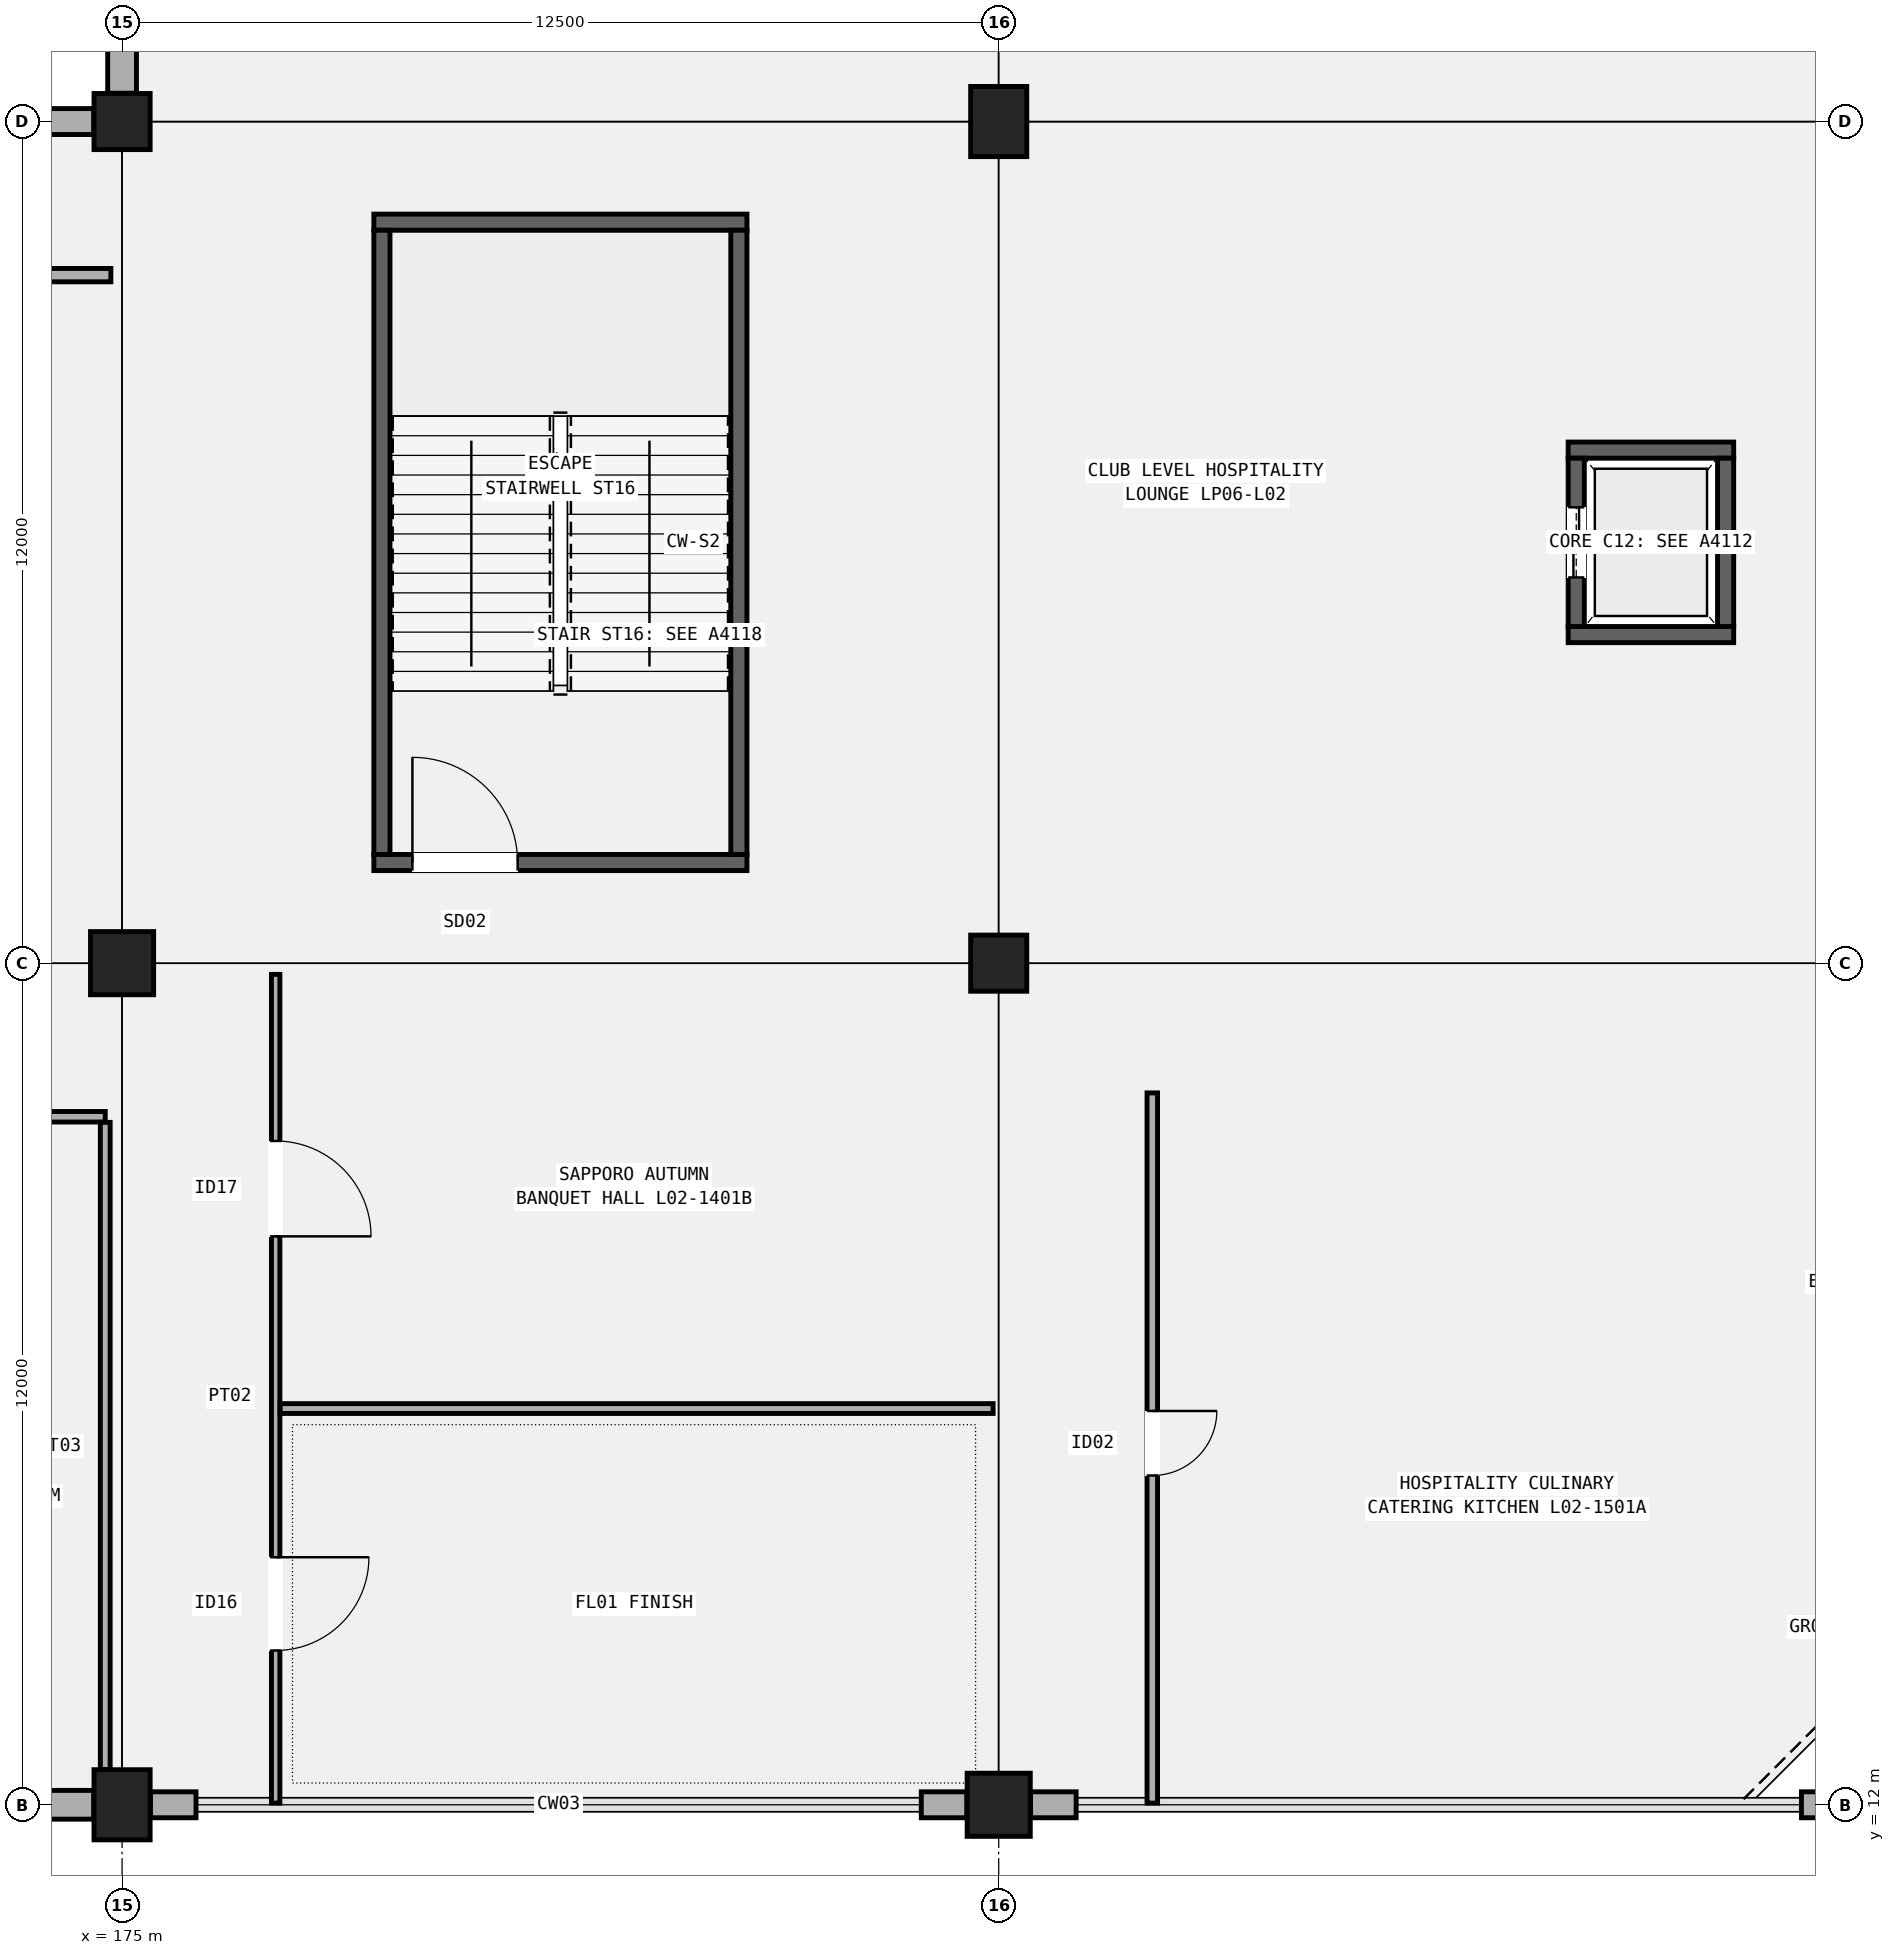
"""IFC4 building model, lengths in metres.
Left out: names, types, materials, properties, quantities, classifications, styles, units other than length and angle.
Written with IfcOpenShell. Run it as: python <this file> out.ifc"""

import sys

from ifc_helpers import new_model, si_unit, direction, frame, frame_2d, origin, origin_2d, place, context, subcontext, project, spatial, rectangle, extrude, element, fill, save


model = new_model("IFC4")
c1 = context("Model", 3, precision=1e-05, world=origin(), true_north=direction((0.0, 1.0)))
c2 = subcontext(c1, "Body", "Model", "MODEL_VIEW")
j1 = project(units=[si_unit("LENGTHUNIT", "METRE"), si_unit("PLANEANGLEUNIT", "RADIAN")], contexts=[c1])
p1 = place(None, origin())
s1 = spatial("IfcSite", under=j1, at=p1, CompositionType="ELEMENT")
p2 = place(p1, origin())
s2 = spatial("IfcBuilding", under=s1, at=p2, CompositionType="ELEMENT")
p3 = place(p2, frame((0.0, 0.0, 10.2)))
s3 = spatial("IfcBuildingStorey", under=s2, at=p3, CompositionType="ELEMENT", Elevation=10.2)
p4 = place(p3, frame((175.0, 12.0, 0.0), z_axis=(0.0, 0.0, 1.0), x_axis=(1.0, 0.0, 0.0)))
e1 = element("IfcColumn", 1, at=p4, inside=s3, PredefinedType="COLUMN", context=c2, shape_type="SweptSolid", body=[
    extrude(rectangle(XDim=0.8, YDim=1.0, at=origin_2d()), origin(), (0.0, 0.0, 1.0), 5.1),
])
p5 = place(p3, frame((175.0, 24.0, 0.0), z_axis=(0.0, 0.0, 1.0), x_axis=(1.0, 0.0, 0.0)))
e2 = element("IfcColumn", 2, at=p5, inside=s3, PredefinedType="COLUMN", context=c2, shape_type="SweptSolid", body=[
    extrude(rectangle(XDim=0.9, YDim=0.9, at=origin_2d()), origin(), (0.0, 0.0, 1.0), 5.1),
])
p6 = place(p3, frame((175.0, 36.0, 0.0), z_axis=(0.0, 0.0, 1.0), x_axis=(1.0, 0.0, 0.0)))
e3 = element("IfcColumn", 3, at=p6, inside=s3, PredefinedType="COLUMN", context=c2, shape_type="SweptSolid", body=[
    extrude(rectangle(XDim=0.8, YDim=0.8, at=origin_2d()), origin(), (0.0, 0.0, 1.0), 5.1),
])
p7 = place(p3, frame((187.5, 12.0, 0.0), z_axis=(0.0, 0.0, 1.0), x_axis=(1.0, 0.0, 0.0)))
e4 = element("IfcColumn", 4, at=p7, inside=s3, PredefinedType="COLUMN", context=c2, shape_type="SweptSolid", body=[
    extrude(rectangle(XDim=0.9, YDim=0.9, at=origin_2d()), origin(), (0.0, 0.0, 1.0), 5.1),
])
p8 = place(p3, frame((187.5, 24.0, 0.0), z_axis=(0.0, 0.0, 1.0), x_axis=(1.0, 0.0, 0.0)))
e5 = element("IfcColumn", 5, at=p8, inside=s3, PredefinedType="COLUMN", context=c2, shape_type="SweptSolid", body=[
    extrude(rectangle(XDim=0.8, YDim=0.8, at=origin_2d()), origin(), (0.0, 0.0, 1.0), 5.1),
])
p9 = place(p3, frame((187.5, 36.0, 0.0), z_axis=(0.0, 0.0, 1.0), x_axis=(1.0, 0.0, 0.0)))
e6 = element("IfcColumn", 6, at=p9, inside=s3, PredefinedType="COLUMN", context=c2, shape_type="SweptSolid", body=[
    extrude(rectangle(XDim=0.8, YDim=1.0, at=origin_2d()), origin(), (0.0, 0.0, 1.0), 5.1),
])
p10 = place(p3, frame((162.904, 12.0, 0.0), z_axis=(0.0, 0.0, 1.0), x_axis=(1.0, 0.0, 0.0)))
e7 = element("IfcWall", 7, at=p10, inside=s3, PredefinedType="SOLIDWALL", context=c2, shape_type="SweptSolid", body=[
    extrude(rectangle(XDim=11.692, YDim=0.41, at=frame_2d((5.846, 0.0))), origin(), (0.0, 0.0, 1.0), 4.22),
])
p11 = place(p10, frame((3.404, 0.0, 0.95)))
e8 = element("IfcOpeningElement", 8, at=p11, cuts=e7, PredefinedType="OPENING", context=c2, shape_type="SweptSolid", body=[
    extrude(rectangle(XDim=3.3, YDim=1.8, at=frame_2d((1.65, 0.9))), frame((0.0, 0.215, 0.0), z_axis=(0.0, -1.0, 0.0), x_axis=(1.0, 0.0, 0.0)), (0.0, 0.0, 1.0), 0.43),
])
p12 = place(p3, frame((173.946, 36.0, 0.0), z_axis=(0.0, 0.0, 1.0), x_axis=(1.0, 0.0, 0.0)))
e9 = element("IfcWall", 9, at=p12, inside=s3, PredefinedType="SOLIDWALL", context=c2, shape_type="SweptSolid", body=[
    extrude(rectangle(XDim=0.65, YDim=0.37, at=frame_2d((0.325, 0.0))), origin(), (0.0, 0.0, 1.0), 4.12),
])
for number, where, z_axis, x_axis in (
    (10, (175.404, 12.0, 0.0), (0.0, 0.0, 1.0), (1.0, 0.0, 0.0)),
    (11, (186.396, 12.0, 0.0), (0.0, 0.0, 1.0), (1.0, 0.0, 0.0)),
):
    element("IfcWall", number, at=place(p3, frame(where, z_axis=z_axis, x_axis=x_axis)), inside=s3, PredefinedType="SOLIDWALL", context=c2, shape_type="SweptSolid", body=[
        extrude(rectangle(XDim=0.65, YDim=0.37, at=frame_2d((0.325, 0.0))), origin(), (0.0, 0.0, 1.0), 4.02),
    ])
p13 = place(p3, frame((175.0, 36.404, 0.0), z_axis=(0.0, 0.0, 1.0), x_axis=(0.0, 1.0, 0.0)))
e12 = element("IfcWall", 12, at=p13, inside=s3, PredefinedType="SOLIDWALL", context=c2, shape_type="SweptSolid", body=[
    extrude(rectangle(XDim=11.092, YDim=0.41, at=frame_2d((5.546, 0.0))), origin(), (0.0, 0.0, 1.0), 4.232),
])
p14 = place(p13, frame((1.5, 0.0, 0.95)))
e13 = element("IfcOpeningElement", 13, at=p14, cuts=e12, PredefinedType="OPENING", context=c2, shape_type="SweptSolid", body=[
    extrude(rectangle(XDim=3.6, YDim=2.15, at=frame_2d((1.8, 1.075))), frame((0.0, 0.215, 0.0), z_axis=(0.0, -1.0, 0.0), x_axis=(1.0, 0.0, 0.0)), (0.0, 0.0, 1.0), 0.43),
])
for number, where, z_axis, x_axis in (
    (14, (187.954, 12.0, 0.0), (0.0, 0.0, 1.0), (1.0, 0.0, 0.0)),
    (15, (198.946, 12.0, 0.0), (0.0, 0.0, 1.0), (1.0, 0.0, 0.0)),
):
    element("IfcWall", number, at=place(p3, frame(where, z_axis=z_axis, x_axis=x_axis)), inside=s3, PredefinedType="SOLIDWALL", context=c2, shape_type="SweptSolid", body=[
        extrude(rectangle(XDim=0.65, YDim=0.37, at=frame_2d((0.325, 0.0))), origin(), (0.0, 0.0, 1.0), 4.12),
    ])
p15 = place(p3, frame((178.59, 25.435, 0.0), z_axis=(0.0, 0.0, 1.0), x_axis=(1.0, 0.0, 0.0)))
e16 = element("IfcWall", 16, at=p15, inside=s3, PredefinedType="SHEAR", context=c2, shape_type="SweptSolid", body=[
    extrude(rectangle(XDim=5.32, YDim=0.23, at=frame_2d((2.66, 0.0))), origin(), (0.0, 0.0, 1.0), 4.82),
])
p16 = place(p15, frame((0.55, 0.0, 0.0)))
e17 = element("IfcOpeningElement", 17, at=p16, cuts=e16, PredefinedType="OPENING", context=c2, shape_type="SweptSolid", body=[
    extrude(rectangle(XDim=1.5, YDim=2.2, at=frame_2d((0.75, 1.1))), frame((0.0, 0.125, 0.0), z_axis=(0.0, -1.0, 0.0), x_axis=(1.0, 0.0, 0.0)), (0.0, 0.0, 1.0), 0.25),
])
p17 = place(p3, frame((178.59, 34.565, 0.0), z_axis=(0.0, 0.0, 1.0), x_axis=(1.0, 0.0, 0.0)))
e18 = element("IfcWall", 18, at=p17, inside=s3, PredefinedType="SHEAR", context=c2, shape_type="SweptSolid", body=[
    extrude(rectangle(XDim=5.32, YDim=0.23, at=frame_2d((2.66, 0.0))), origin(), (0.0, 0.0, 1.0), 4.82),
])
for number, where, z_axis, x_axis in (
    (19, (178.705, 25.55, 0.0), (0.0, 0.0, 1.0), (0.0, 1.0, 0.0)),
    (20, (183.795, 25.55, 0.0), (0.0, 0.0, 1.0), (0.0, 1.0, 0.0)),
):
    element("IfcWall", number, at=place(p3, frame(where, z_axis=z_axis, x_axis=x_axis)), inside=s3, PredefinedType="SHEAR", context=c2, shape_type="SweptSolid", body=[
        extrude(rectangle(XDim=8.9, YDim=0.23, at=frame_2d((4.45, 0.0))), origin(), (0.0, 0.0, 1.0), 4.82),
    ])
for number, where, z_axis, x_axis in (
    (21, (195.62, 28.685, 0.0), (0.0, 0.0, 1.0), (1.0, 0.0, 0.0)),
    (22, (195.62, 31.315, 0.0), (0.0, 0.0, 1.0), (1.0, 0.0, 0.0)),
):
    element("IfcWall", number, at=place(p3, frame(where, z_axis=z_axis, x_axis=x_axis)), inside=s3, PredefinedType="SHEAR", context=c2, shape_type="SweptSolid", body=[
        extrude(rectangle(XDim=2.36, YDim=0.23, at=frame_2d((1.18, 0.0))), origin(), (0.0, 0.0, 1.0), 4.82),
    ])
p18 = place(p3, frame((195.735, 28.8, 0.0), z_axis=(0.0, 0.0, 1.0), x_axis=(0.0, 1.0, 0.0)))
e23 = element("IfcWall", 23, at=p18, inside=s3, PredefinedType="SHEAR", context=c2, shape_type="SweptSolid", body=[
    extrude(rectangle(XDim=2.4, YDim=0.23, at=frame_2d((1.2, 0.0))), origin(), (0.0, 0.0, 1.0), 4.82),
])
p19 = place(p18, frame((0.7, 0.0, 0.0)))
e24 = element("IfcOpeningElement", 24, at=p19, cuts=e23, PredefinedType="OPENING", context=c2, shape_type="SweptSolid", body=[
    extrude(rectangle(XDim=1.0, YDim=2.15, at=frame_2d((0.5, 1.075))), frame((0.0, 0.125, 0.0), z_axis=(0.0, -1.0, 0.0), x_axis=(1.0, 0.0, 0.0)), (0.0, 0.0, 1.0), 0.25),
])
p20 = place(p3, frame((197.865, 28.8, 0.0), z_axis=(0.0, 0.0, 1.0), x_axis=(0.0, 1.0, 0.0)))
e25 = element("IfcWall", 25, at=p20, inside=s3, PredefinedType="SHEAR", context=c2, shape_type="SweptSolid", body=[
    extrude(rectangle(XDim=2.4, YDim=0.23, at=frame_2d((1.2, 0.0))), origin(), (0.0, 0.0, 1.0), 4.82),
])
p21 = place(p3, frame((162.74, 21.81, 0.0), z_axis=(0.0, 0.0, 1.0), x_axis=(1.0, 0.0, 0.0)))
e26 = element("IfcWall", 26, at=p21, inside=s3, PredefinedType="PARTITIONING", context=c2, shape_type="SweptSolid", body=[
    extrude(rectangle(XDim=12.02, YDim=0.15, at=frame_2d((6.01, 0.0))), origin(), (0.0, 0.0, 1.0), 4.22),
])
p22 = place(p21, frame((2.062, 0.0, 0.0), z_axis=(0.0, 0.0, 1.0), x_axis=(-1.0, 0.0, 0.0)))
e27 = element("IfcOpeningElement", 27, at=p22, cuts=e26, PredefinedType="OPENING", context=c2, shape_type="SweptSolid", body=[
    extrude(rectangle(XDim=1.12, YDim=2.18, at=frame_2d((0.56, 1.09))), frame((0.0, 0.085, 0.0), z_axis=(0.0, -1.0, 0.0), x_axis=(1.0, 0.0, 0.0)), (0.0, 0.0, 1.0), 0.17),
])
p23 = place(p21, frame((5.833, 0.0, 0.0), z_axis=(0.0, 0.0, 1.0), x_axis=(-1.0, 0.0, 0.0)))
e28 = element("IfcOpeningElement", 28, at=p23, cuts=e26, PredefinedType="OPENING", context=c2, shape_type="SweptSolid", body=[
    extrude(rectangle(XDim=1.15, YDim=2.15, at=frame_2d((0.575, 1.075))), frame((0.0, 0.085, 0.0), z_axis=(0.0, -1.0, 0.0), x_axis=(1.0, 0.0, 0.0)), (0.0, 0.0, 1.0), 0.17),
])
p24 = place(p21, frame((10.356, 0.0, 0.0), z_axis=(0.0, 0.0, 1.0), x_axis=(-1.0, 0.0, 0.0)))
e29 = element("IfcOpeningElement", 29, at=p24, cuts=e26, PredefinedType="OPENING", context=c2, shape_type="SweptSolid", body=[
    extrude(rectangle(XDim=1.18, YDim=2.2, at=frame_2d((0.59, 1.1))), frame((0.0, 0.085, 0.0), z_axis=(0.0, -1.0, 0.0), x_axis=(1.0, 0.0, 0.0)), (0.0, 0.0, 1.0), 0.17),
])
p25 = place(p3, frame((174.76, 12.504, 0.0), z_axis=(0.0, 0.0, 1.0), x_axis=(0.0, 1.0, 0.0)))
e30 = element("IfcWall", 30, at=p25, inside=s3, PredefinedType="PARTITIONING", context=c2, shape_type="SweptSolid", body=[
    extrude(rectangle(XDim=9.226, YDim=0.14, at=frame_2d((4.613, 0.0))), origin(), (0.0, 0.0, 1.0), 3.98),
])
p26 = place(p3, frame((162.66, 33.81, 0.0), z_axis=(0.0, 0.0, 1.0), x_axis=(1.0, 0.0, 0.0)))
e31 = element("IfcWall", 31, at=p26, inside=s3, PredefinedType="PARTITIONING", context=c2, shape_type="SweptSolid", body=[
    extrude(rectangle(XDim=12.18, YDim=0.19, at=frame_2d((6.09, 0.0))), origin(), (0.0, 0.0, 1.0), 4.22),
])
p27 = place(p26, frame((6.695, 0.0, 0.0), z_axis=(0.0, 0.0, 1.0), x_axis=(-1.0, 0.0, 0.0)))
e32 = element("IfcOpeningElement", 32, at=p27, cuts=e31, PredefinedType="OPENING", context=c2, shape_type="SweptSolid", body=[
    extrude(rectangle(XDim=1.21, YDim=2.18, at=frame_2d((0.605, 1.09))), frame((0.0, 0.105, 0.0), z_axis=(0.0, -1.0, 0.0), x_axis=(1.0, 0.0, 0.0)), (0.0, 0.0, 1.0), 0.21),
])
p28 = place(p3, frame((177.19, 12.024, 0.0), z_axis=(0.0, 0.0, 1.0), x_axis=(0.0, 1.0, 0.0)))
e33 = element("IfcWall", 33, at=p28, inside=s3, PredefinedType="PARTITIONING", context=c2, shape_type="SweptSolid", body=[
    extrude(rectangle(XDim=11.816, YDim=0.12, at=frame_2d((5.908, 0.0))), origin(), (0.0, 0.0, 1.0), 4.22),
])
p29 = place(p28, frame((3.506, 0.0, 0.0), z_axis=(0.0, 0.0, 1.0), x_axis=(-1.0, 0.0, 0.0)))
e34 = element("IfcOpeningElement", 34, at=p29, cuts=e33, PredefinedType="OPENING", context=c2, shape_type="SweptSolid", body=[
    extrude(rectangle(XDim=1.33, YDim=2.22, at=frame_2d((0.665, 1.11))), frame((0.0, 0.07, 0.0), z_axis=(0.0, -1.0, 0.0), x_axis=(1.0, 0.0, 0.0)), (0.0, 0.0, 1.0), 0.14),
])
p30 = place(p28, frame((9.441, 0.0, 0.0), z_axis=(0.0, 0.0, 1.0), x_axis=(-1.0, 0.0, 0.0)))
e35 = element("IfcOpeningElement", 35, at=p30, cuts=e33, PredefinedType="OPENING", context=c2, shape_type="SweptSolid", body=[
    extrude(rectangle(XDim=1.36, YDim=2.25, at=frame_2d((0.68, 1.125))), frame((0.0, 0.07, 0.0), z_axis=(0.0, -1.0, 0.0), x_axis=(1.0, 0.0, 0.0)), (0.0, 0.0, 1.0), 0.14),
])
p31 = place(p3, frame((177.255, 17.65, 0.0), z_axis=(0.0, 0.0, 1.0), x_axis=(1.0, 0.0, 0.0)))
e36 = element("IfcWall", 36, at=p31, inside=s3, PredefinedType="PARTITIONING", context=c2, shape_type="SweptSolid", body=[
    extrude(rectangle(XDim=10.165, YDim=0.14, at=frame_2d((5.083, 0.0))), origin(), (0.0, 0.0, 1.0), 4.22),
])
p32 = place(p3, frame((189.69, 12.024, 0.0), z_axis=(0.0, 0.0, 1.0), x_axis=(0.0, 1.0, 0.0)))
e37 = element("IfcWall", 37, at=p32, inside=s3, PredefinedType="PARTITIONING", context=c2, shape_type="SweptSolid", body=[
    extrude(rectangle(XDim=10.126, YDim=0.15, at=frame_2d((5.063, 0.0))), origin(), (0.0, 0.0, 1.0), 4.22),
])
p33 = place(p32, frame((5.591, 0.0, 0.0), z_axis=(0.0, 0.0, 1.0), x_axis=(-1.0, 0.0, 0.0)))
e38 = element("IfcOpeningElement", 38, at=p33, cuts=e37, PredefinedType="OPENING", context=c2, shape_type="SweptSolid", body=[
    extrude(rectangle(XDim=0.92, YDim=2.1, at=frame_2d((0.46, 1.05))), frame((0.0, 0.085, 0.0), z_axis=(0.0, -1.0, 0.0), x_axis=(1.0, 0.0, 0.0)), (0.0, 0.0, 1.0), 0.17),
])
p34 = place(p16, origin())
e39 = element("IfcDoor", 39, at=p34, inside=s3, OperationType="SINGLE_SWING_LEFT", PredefinedType="DOOR", context=c2, shape_type="SweptSolid", body=[
    extrude(rectangle(XDim=1.5, YDim=2.2, at=frame_2d((0.75, 1.1))), frame((0.0, 0.025, 0.0), z_axis=(0.0, -1.0, 0.0), x_axis=(1.0, 0.0, 0.0)), (0.0, 0.0, 1.0), 0.05),
])
fill(e17, e39)
p35 = place(p19, origin())
e40 = element("IfcDoor", 40, at=p35, inside=s3, OperationType="DOUBLE_DOOR_SLIDING", PredefinedType="DOOR", context=c2, shape_type="SweptSolid", body=[
    extrude(rectangle(XDim=1.0, YDim=2.15, at=frame_2d((0.5, 1.075))), frame((0.0, 0.025, 0.0), z_axis=(0.0, -1.0, 0.0), x_axis=(1.0, 0.0, 0.0)), (0.0, 0.0, 1.0), 0.05),
])
fill(e24, e40)
p36 = place(p29, origin())
e41 = element("IfcDoor", 41, at=p36, inside=s3, OperationType="SINGLE_SWING_LEFT", PredefinedType="DOOR", context=c2, shape_type="SweptSolid", body=[
    extrude(rectangle(XDim=1.33, YDim=2.22, at=frame_2d((0.665, 1.11))), frame((0.0, 0.025, 0.0), z_axis=(0.0, -1.0, 0.0), x_axis=(1.0, 0.0, 0.0)), (0.0, 0.0, 1.0), 0.05),
])
fill(e34, e41)
p37 = place(p30, origin())
e42 = element("IfcDoor", 42, at=p37, inside=s3, OperationType="SINGLE_SWING_RIGHT", PredefinedType="DOOR", context=c2, shape_type="SweptSolid", body=[
    extrude(rectangle(XDim=1.36, YDim=2.25, at=frame_2d((0.68, 1.125))), frame((0.0, 0.025, 0.0), z_axis=(0.0, -1.0, 0.0), x_axis=(1.0, 0.0, 0.0)), (0.0, 0.0, 1.0), 0.05),
])
fill(e35, e42)
p38 = place(p33, origin())
e43 = element("IfcDoor", 43, at=p38, inside=s3, OperationType="SINGLE_SWING_LEFT", PredefinedType="DOOR", context=c2, shape_type="SweptSolid", body=[
    extrude(rectangle(XDim=0.92, YDim=2.1, at=frame_2d((0.46, 1.05))), frame((0.0, 0.025, 0.0), z_axis=(0.0, -1.0, 0.0), x_axis=(1.0, 0.0, 0.0)), (0.0, 0.0, 1.0), 0.05),
])
fill(e38, e43)
save(model, sys.argv[1])
